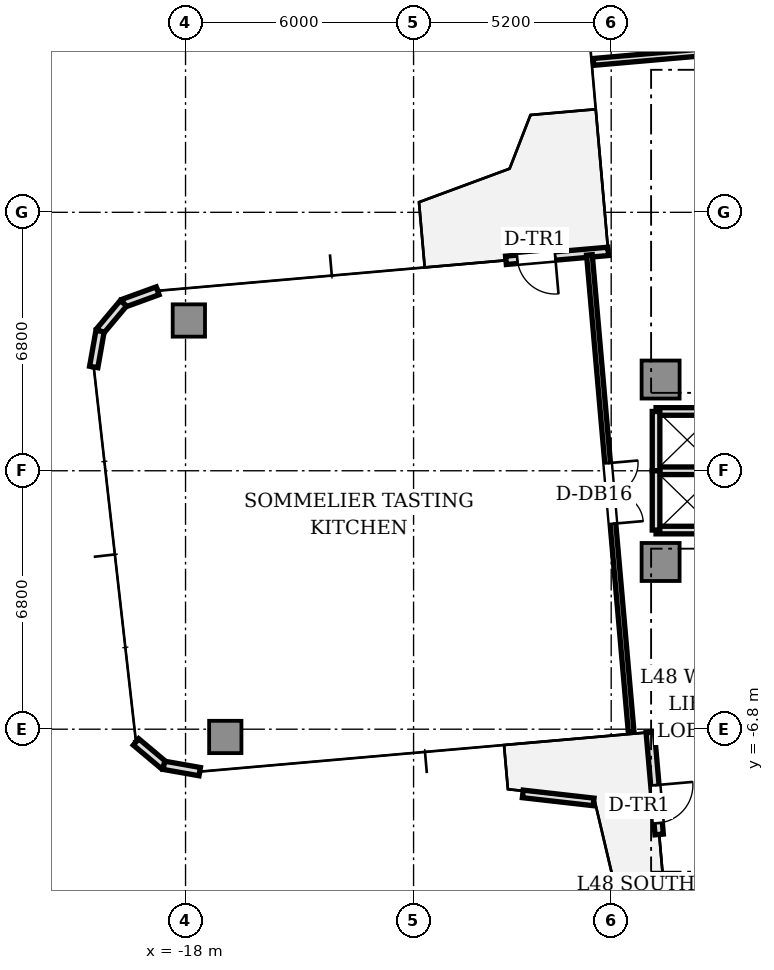
"""IFC4 building model, lengths in metres.
Left out: names, types, materials, properties, quantities, classifications, styles, units other than length and angle.
Written with IfcOpenShell. Run it as: python <this file> out.ifc"""

import sys

from ifc_helpers import new_model, si_unit, direction, frame, frame_2d, origin, origin_2d, place, context, subcontext, project, spatial, rectangle, extrude, source, transform, mapped, element, fill, save


model = new_model("IFC4")
c1 = context("Model", 3, precision=1e-05, world=origin(), true_north=direction((0.0, 1.0)))
c2 = subcontext(c1, "Body", "Model", "MODEL_VIEW")
j1 = project(units=[si_unit("LENGTHUNIT", "METRE"), si_unit("PLANEANGLEUNIT", "RADIAN")], contexts=[c1])
p1 = place(None, origin())
s1 = spatial("IfcSite", under=j1, at=p1, CompositionType="ELEMENT")
p2 = place(p1, origin())
s2 = spatial("IfcBuilding", under=s1, at=p2, CompositionType="ELEMENT")
p3 = place(p2, frame((0.0, 0.0, 175.2)))
s3 = spatial("IfcBuildingStorey", under=s2, at=p3, CompositionType="ELEMENT", Elevation=175.2)
m1 = source(origin(), c2, "Body", "SweptSolid", [
    extrude(rectangle(XDim=1.0, YDim=1.0, at=origin_2d()), origin(), (0.0, 0.0, 1.0), 3.11),
])
for number, where, z_axis, x_axis in (
    (1, (-5.5, 2.4, 0.0), (0.0, 0.0, 1.0), (1.0, 0.0, 0.0)),
    (2, (-5.5, -2.4, 0.0), (0.0, 0.0, 1.0), (1.0, 0.0, 0.0)),
):
    element("IfcColumn", number, at=place(p3, frame(where, z_axis=z_axis, x_axis=x_axis)), inside=s3, PredefinedType="COLUMN", context=c2, shape_type="MappedRepresentation", body=[
        mapped(m1, transform((0.0, 0.0, 0.0), scale=1.0)),
    ])
m2 = source(origin(), c2, "Body", "SweptSolid", [
    extrude(rectangle(XDim=0.85, YDim=0.85, at=origin_2d()), origin(), (0.0, 0.0, 1.0), 3.11),
])
for number, where, z_axis, x_axis in (
    (3, (-17.913, 3.954, 0.0), (0.0, 0.0, 1.0), (1.0, 0.0, 0.0)),
    (4, (-16.954, -7.004, 0.0), (0.0, 0.0, 1.0), (1.0, 0.0, 0.0)),
):
    element("IfcColumn", number, at=place(p3, frame(where, z_axis=z_axis, x_axis=x_axis)), inside=s3, PredefinedType="COLUMN", context=c2, shape_type="MappedRepresentation", body=[
        mapped(m2, transform((0.0, 0.0, 0.0), scale=1.0)),
    ])
p4 = place(p3, frame((-6.879, 5.772, 0.0), z_axis=(0.0, 0.0, 1.0), x_axis=(-0.996193619346, -0.087168071984, 0.0)))
e5 = element("IfcWall", 5, at=p4, inside=s3, PredefinedType="STANDARD", context=c2, shape_type="SweptSolid", body=[
    extrude(rectangle(XDim=2.7, YDim=0.22, at=frame_2d((1.35, 0.0))), origin(), (0.0, 0.0, 1.0), 3.11),
])
p5 = place(p4, frame((1.4, 0.0, 0.0)))
e6 = element("IfcOpeningElement", 6, at=p5, cuts=e5, PredefinedType="OPENING", context=c2, shape_type="SweptSolid", body=[
    extrude(rectangle(XDim=1.0, YDim=2.2, at=frame_2d((0.5, 1.1))), frame((0.0, 0.12, 0.0), z_axis=(0.0, -1.0, 0.0), x_axis=(1.0, 0.0, 0.0)), (0.0, 0.0, 1.0), 0.24),
])
p6 = place(p3, frame((-18.734, 4.735, 0.0), z_axis=(0.0, 0.0, 1.0), x_axis=(-0.939741306239, -0.34188635151, 0.0)))
e7 = element("IfcWall", 7, at=p6, inside=s3, PredefinedType="STANDARD", context=c2, shape_type="SweptSolid", body=[
    extrude(rectangle(XDim=0.958, YDim=0.22, at=frame_2d((0.479, 0.0))), origin(), (0.0, 0.0, 1.0), 3.11),
])
for number, where, z_axis, x_axis in (
    (8, (-19.634, 4.408, 0.0), (0.0, 0.0, 1.0), (-0.643, -0.766, 0.0)),
    (9, (-20.25, 3.674, 0.0), (0.0, 0.0, 1.0), (-0.174, -0.985, 0.0)),
):
    element("IfcWall", number, at=place(p3, frame(where, z_axis=z_axis, x_axis=x_axis)), inside=s3, PredefinedType="STANDARD", context=c2, shape_type="SweptSolid", body=[
        extrude(rectangle(XDim=0.958, YDim=0.22, at=frame_2d((0.479, 0.0))), origin(), (0.0, 0.0, 1.0), 3.11),
    ])
p7 = place(p3, frame((-19.304, -7.135, 0.0), z_axis=(0.0, 0.0, 1.0), x_axis=(0.766001159887, -0.642839189107, 0.0)))
e10 = element("IfcWall", 10, at=p7, inside=s3, PredefinedType="STANDARD", context=c2, shape_type="SweptSolid", body=[
    extrude(rectangle(XDim=0.958, YDim=0.22, at=frame_2d((0.479, 0.0))), origin(), (0.0, 0.0, 1.0), 3.11),
])
p8 = place(p3, frame((-18.57, -7.75, 0.0), z_axis=(0.0, 0.0, 1.0), x_axis=(0.984770724397, -0.173858046606, 0.0)))
e11 = element("IfcWall", 11, at=p8, inside=s3, PredefinedType="STANDARD", context=c2, shape_type="SweptSolid", body=[
    extrude(rectangle(XDim=0.958, YDim=0.22, at=frame_2d((0.479, 0.0))), origin(), (0.0, 0.0, 1.0), 3.11),
])
p9 = place(p3, frame((-5.772, -6.879, 0.0), z_axis=(0.0, 0.0, 1.0), x_axis=(0.087168071984, -0.996193619346, 0.0)))
e12 = element("IfcWall", 12, at=p9, inside=s3, PredefinedType="STANDARD", context=c2, shape_type="SweptSolid", body=[
    extrude(rectangle(XDim=2.7, YDim=0.22, at=frame_2d((1.35, 0.0))), origin(), (0.0, 0.0, 1.0), 3.11),
])
p10 = place(p9, frame((1.4, 0.0, 0.0)))
e13 = element("IfcOpeningElement", 13, at=p10, cuts=e12, PredefinedType="OPENING", context=c2, shape_type="SweptSolid", body=[
    extrude(rectangle(XDim=1.0, YDim=2.2, at=frame_2d((0.5, 1.1))), frame((0.0, 0.12, 0.0), z_axis=(0.0, -1.0, 0.0), x_axis=(1.0, 0.0, 0.0)), (0.0, 0.0, 1.0), 0.24),
])
p11 = place(p3, frame((-9.126, -8.503, 0.0), z_axis=(0.0, 0.0, 1.0), x_axis=(0.993667512834, -0.112360464305, 0.0)))
e14 = element("IfcWall", 14, at=p11, inside=s3, PredefinedType="PARAPET", context=c2, shape_type="SweptSolid", body=[
    extrude(rectangle(XDim=1.875, YDim=0.2, at=frame_2d((0.938, 0.0))), origin(), (0.0, 0.0, 1.0), 0.65),
])
for number, where, z_axis, x_axis in (
    (15, (-5.62, 1.56, 0.0), (0.0, 0.0, 1.0), (1.0, 0.0, 0.0)),
    (16, (-5.62, -1.56, 0.0), (0.0, 0.0, 1.0), (1.0, 0.0, 0.0)),
    (17, (-5.62, 0.0, 0.0), (0.0, 0.0, 1.0), (1.0, 0.0, 0.0)),
):
    element("IfcWall", number, at=place(p3, frame(where, z_axis=z_axis, x_axis=x_axis)), inside=s3, PredefinedType="SOLIDWALL", context=c2, shape_type="SweptSolid", body=[
        extrude(rectangle(XDim=1.64, YDim=0.2, at=frame_2d((0.82, 0.0))), origin(), (0.0, 0.0, 1.0), 2.66),
    ])
for number, where, z_axis, x_axis in (
    (18, (-5.62, 0.0, 0.0), (0.0, 0.0, 1.0), (0.0, 1.0, 0.0)),
    (19, (-5.62, -1.56, 0.0), (0.0, 0.0, 1.0), (0.0, 1.0, 0.0)),
):
    element("IfcWall", number, at=place(p3, frame(where, z_axis=z_axis, x_axis=x_axis)), inside=s3, PredefinedType="SOLIDWALL", context=c2, shape_type="SweptSolid", body=[
        extrude(rectangle(XDim=1.56, YDim=0.2, at=frame_2d((0.78, 0.0))), origin(), (0.0, 0.0, 1.0), 2.66),
    ])
p12 = place(p3, frame((3.095, 11.664, 0.0), z_axis=(0.0, 0.0, 1.0), x_axis=(-0.996196061386, -0.087140158824, 0.0)))
e20 = element("IfcWall", 20, at=p12, inside=s3, PredefinedType="PARTITIONING", context=c2, shape_type="SweptSolid", body=[
    extrude(rectangle(XDim=10.4, YDim=0.18, at=frame_2d((5.2, 0.0))), origin(), (0.0, 0.0, 1.0), 2.66),
])
p13 = place(p3, frame((-7.373, 5.679, 0.0), z_axis=(0.0, 0.0, 1.0), x_axis=(0.087154691724, -0.996194790044, 0.0)))
e21 = element("IfcWall", 21, at=p13, inside=s3, PredefinedType="PARTITIONING", context=c2, shape_type="SweptSolid", body=[
    extrude(rectangle(XDim=12.6, YDim=0.15, at=frame_2d((6.3, 0.0))), origin(), (0.0, 0.0, 1.0), 2.66),
])
p14 = place(p13, frame((5.5, 0.0, 0.0)))
e22 = element("IfcOpeningElement", 22, at=p14, cuts=e21, PredefinedType="OPENING", context=c2, shape_type="SweptSolid", body=[
    extrude(rectangle(XDim=1.6, YDim=2.25, at=frame_2d((0.8, 1.125))), frame((0.0, 0.085, 0.0), z_axis=(0.0, -1.0, 0.0), x_axis=(1.0, 0.0, 0.0)), (0.0, 0.0, 1.0), 0.17),
])
m3 = source(origin(), c2, "Body", "SweptSolid", [
    extrude(rectangle(XDim=1.0, YDim=0.05, at=origin_2d()), origin(), (0.0, 0.0, 1.0), 2.2),
])
p15 = place(p5, frame((0.5, 0.0, 0.0)))
e23 = element("IfcDoor", 23, at=p15, inside=s3, OperationType="SINGLE_SWING_LEFT", PredefinedType="DOOR", context=c2, shape_type="MappedRepresentation", body=[
    mapped(m3, transform((0.0, 0.0, 0.0), scale=1.0)),
])
fill(e6, e23)
p16 = place(p10, frame((0.5, 0.0, 0.0)))
e24 = element("IfcDoor", 24, at=p16, inside=s3, OperationType="SINGLE_SWING_LEFT", PredefinedType="DOOR", context=c2, shape_type="MappedRepresentation", body=[
    mapped(m3, transform((0.0, 0.0, 0.0), scale=1.0)),
])
fill(e13, e24)
m4 = source(origin(), c2, "Body", "SweptSolid", [
    extrude(rectangle(XDim=1.6, YDim=0.05, at=origin_2d()), origin(), (0.0, 0.0, 1.0), 2.25),
])
p17 = place(p14, frame((0.8, 0.0, 0.0)))
e25 = element("IfcDoor", 25, at=p17, inside=s3, OperationType="DOUBLE_DOOR_SINGLE_SWING", PredefinedType="DOOR", context=c2, shape_type="MappedRepresentation", body=[
    mapped(m4, transform((0.0, 0.0, 0.0), scale=1.0)),
])
fill(e22, e25)
save(model, sys.argv[1])
